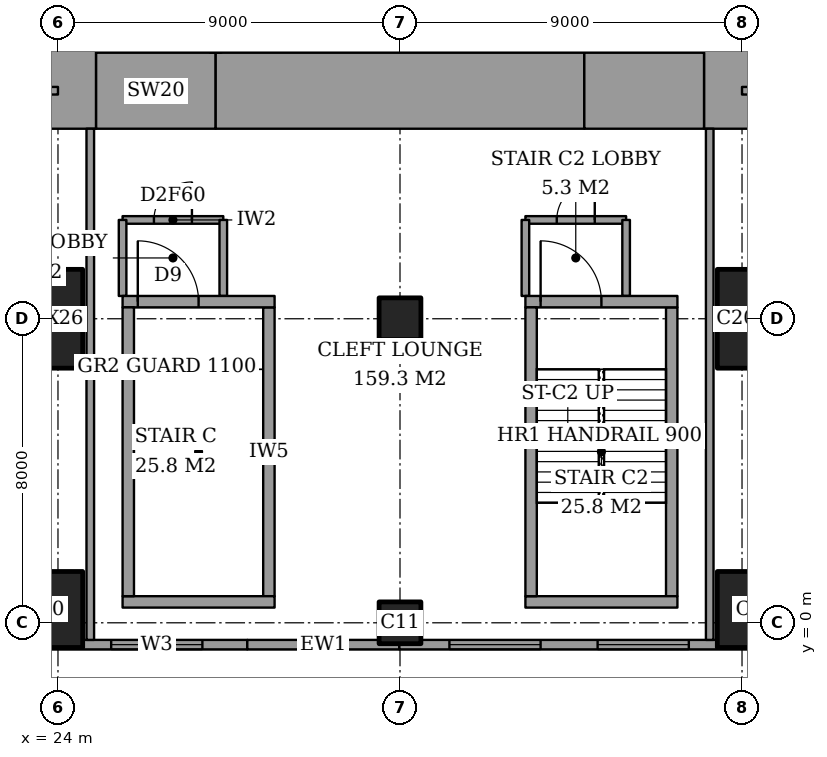
"""IFC4 building model, lengths in metres.
Left out: names, types, materials, properties, quantities, classifications, styles, units other than length and angle.
Written with IfcOpenShell. Run it as: python <this file> out.ifc"""

import sys

from ifc_helpers import new_model, si_unit, direction, frame, frame_2d, origin, origin_2d, place, context, subcontext, project, spatial, rectangle, extrude, element, fill, save


model = new_model("IFC4")
c1 = context("Model", 3, precision=1e-05, world=origin(), true_north=direction((0.0, 1.0)))
c2 = subcontext(c1, "Body", "Model", "MODEL_VIEW")
j1 = project(units=[si_unit("LENGTHUNIT", "METRE"), si_unit("PLANEANGLEUNIT", "RADIAN")], contexts=[c1])
p1 = place(None, origin())
s1 = spatial("IfcSite", under=j1, at=p1, CompositionType="ELEMENT")
p2 = place(p1, origin())
s2 = spatial("IfcBuilding", under=s1, at=p2, CompositionType="ELEMENT")
p3 = place(p2, frame((0.0, 0.0, 21.0)))
s3 = spatial("IfcBuildingStorey", under=s2, at=p3, CompositionType="ELEMENT", Elevation=21.0)
p4 = place(p3, frame((23.65, 0.35, 0.0), z_axis=(0.0, 0.0, 1.0), x_axis=(1.0, 0.0, 0.0)))
e1 = element("IfcColumn", 1, at=p4, inside=s3, PredefinedType="COLUMN", context=c2, shape_type="SweptSolid", body=[
    extrude(rectangle(XDim=2.0, YDim=2.0, at=origin_2d()), origin(), (0.0, 0.0, 1.0), 5.0),
])
p5 = place(p3, frame((23.65, 8.0, 0.0), z_axis=(0.0, 0.0, 1.0), x_axis=(1.0, 0.0, 0.0)))
e2 = element("IfcColumn", 2, at=p5, inside=s3, PredefinedType="COLUMN", context=c2, shape_type="SweptSolid", body=[
    extrude(rectangle(XDim=2.0, YDim=2.6, at=origin_2d()), origin(), (0.0, 0.0, 1.0), 5.0),
])
for number, where, z_axis, x_axis in (
    (3, (33.0, 0.0, 0.0), (0.0, 0.0, 1.0), (1.0, 0.0, 0.0)),
    (4, (33.0, 8.0, 0.0), (0.0, 0.0, 1.0), (1.0, 0.0, 0.0)),
):
    element("IfcColumn", number, at=place(p3, frame(where, z_axis=z_axis, x_axis=x_axis)), inside=s3, PredefinedType="COLUMN", context=c2, shape_type="SweptSolid", body=[
        extrude(rectangle(XDim=1.1, YDim=1.1, at=origin_2d()), origin(), (0.0, 0.0, 1.0), 5.0),
    ])
p6 = place(p3, frame((42.35, 0.35, 0.0), z_axis=(0.0, 0.0, 1.0), x_axis=(1.0, 0.0, 0.0)))
e5 = element("IfcColumn", 5, at=p6, inside=s3, PredefinedType="COLUMN", context=c2, shape_type="SweptSolid", body=[
    extrude(rectangle(XDim=2.0, YDim=2.0, at=origin_2d()), origin(), (0.0, 0.0, 1.0), 5.0),
])
p7 = place(p3, frame((42.35, 8.0, 0.0), z_axis=(0.0, 0.0, 1.0), x_axis=(1.0, 0.0, 0.0)))
e6 = element("IfcColumn", 6, at=p7, inside=s3, PredefinedType="COLUMN", context=c2, shape_type="SweptSolid", body=[
    extrude(rectangle(XDim=2.0, YDim=2.6, at=origin_2d()), origin(), (0.0, 0.0, 1.0), 5.0),
])
p8 = place(p3, frame((25.0, 14.0, 0.0), z_axis=(0.0, 0.0, 1.0), x_axis=(1.0, 0.0, 0.0)))
e7 = element("IfcWall", 7, at=p8, inside=s3, PredefinedType="SHEAR", context=c2, shape_type="SweptSolid", body=[
    extrude(rectangle(XDim=3.15, YDim=2.0, at=frame_2d((1.575, 0.0))), origin(), (0.0, 0.0, 1.0), 5.0),
])
p9 = place(p3, frame((28.15, 14.0, 0.0), z_axis=(0.0, 0.0, 1.0), x_axis=(1.0, 0.0, 0.0)))
e8 = element("IfcWall", 8, at=p9, inside=s3, PredefinedType="SHEAR", context=c2, shape_type="SweptSolid", body=[
    extrude(rectangle(XDim=9.7, YDim=2.0, at=frame_2d((4.85, 0.0))), origin(), (0.0, 0.0, 1.0), 5.0),
])
p10 = place(p3, frame((37.85, 14.0, 0.0), z_axis=(0.0, 0.0, 1.0), x_axis=(1.0, 0.0, 0.0)))
e9 = element("IfcWall", 9, at=p10, inside=s3, PredefinedType="SHEAR", context=c2, shape_type="SweptSolid", body=[
    extrude(rectangle(XDim=3.15, YDim=2.0, at=frame_2d((1.575, 0.0))), origin(), (0.0, 0.0, 1.0), 5.0),
])
p11 = place(p3, frame((24.3, 13.0, 0.0), z_axis=(0.0, 0.0, 1.0), x_axis=(0.0, 1.0, 0.0)))
e10 = element("IfcWall", 10, at=p11, inside=s3, PredefinedType="SHEAR", context=c2, shape_type="SweptSolid", body=[
    extrude(rectangle(XDim=10.15, YDim=1.4, at=frame_2d((5.075, 0.0))), origin(), (0.0, 0.0, 1.0), 5.0),
])
p12 = place(p3, frame((41.7, 13.0, 0.0), z_axis=(0.0, 0.0, 1.0), x_axis=(0.0, 1.0, 0.0)))
e11 = element("IfcWall", 11, at=p12, inside=s3, PredefinedType="SHEAR", context=c2, shape_type="SweptSolid", body=[
    extrude(rectangle(XDim=11.85, YDim=1.4, at=frame_2d((5.925, 0.0))), origin(), (0.0, 0.0, 1.0), 5.0),
])
p13 = place(p12, frame((7.5, 0.0, 0.0)))
e12 = element("IfcOpeningElement", 12, at=p13, cuts=e11, PredefinedType="OPENING", context=c2, shape_type="SweptSolid", body=[
    extrude(rectangle(XDim=1.8, YDim=2.4, at=frame_2d((0.9, 1.2))), frame((0.0, 0.71, 0.0), z_axis=(0.0, -1.0, 0.0), x_axis=(1.0, 0.0, 0.0)), (0.0, 0.0, 1.0), 1.42),
])
p14 = place(p3, frame((3.175, -0.575, 0.0), z_axis=(0.0, 0.0, 1.0), x_axis=(1.0, 0.0, 0.0)))
e13 = element("IfcWall", 13, at=p14, inside=s3, PredefinedType="SOLIDWALL", context=c2, shape_type="SweptSolid", body=[
    extrude(rectangle(XDim=25.807, YDim=0.25, at=frame_2d((12.903, 0.0))), origin(), (0.0, 0.0, 1.0), 5.0),
])
p15 = place(p14, frame((7.625, 0.0, 0.6)))
e14 = element("IfcOpeningElement", 14, at=p15, cuts=e13, PredefinedType="OPENING", context=c2, shape_type="SweptSolid", body=[
    extrude(rectangle(XDim=2.4, YDim=3.0, at=frame_2d((1.2, 1.5))), frame((0.0, 0.135, 0.0), z_axis=(0.0, -1.0, 0.0), x_axis=(1.0, 0.0, 0.0)), (0.0, 0.0, 1.0), 0.27),
])
p16 = place(p14, frame((15.45, 0.0, 0.6)))
e15 = element("IfcOpeningElement", 15, at=p16, cuts=e13, PredefinedType="OPENING", context=c2, shape_type="SweptSolid", body=[
    extrude(rectangle(XDim=2.4, YDim=3.0, at=frame_2d((1.2, 1.5))), frame((0.0, 0.135, 0.0), z_axis=(0.0, -1.0, 0.0), x_axis=(1.0, 0.0, 0.0)), (0.0, 0.0, 1.0), 0.27),
])
p17 = place(p14, frame((22.225, 0.0, 0.6)))
e16 = element("IfcOpeningElement", 16, at=p17, cuts=e13, PredefinedType="OPENING", context=c2, shape_type="SweptSolid", body=[
    extrude(rectangle(XDim=2.4, YDim=3.0, at=frame_2d((1.2, 1.5))), frame((0.0, 0.135, 0.0), z_axis=(0.0, -1.0, 0.0), x_axis=(1.0, 0.0, 0.0)), (0.0, 0.0, 1.0), 0.27),
])
p18 = place(p3, frame((25.7, 10.6, 0.0), z_axis=(0.0, 0.0, 1.0), x_axis=(1.0, 0.0, 0.0)))
e17 = element("IfcWall", 17, at=p18, inside=s3, PredefinedType="PARTITIONING", context=c2, shape_type="SweptSolid", body=[
    extrude(rectangle(XDim=2.65, YDim=0.2, at=frame_2d((1.325, 0.0))), origin(), (0.0, 0.0, 1.0), 4.65),
])
p19 = place(p18, frame((0.825, 0.0, 0.0)))
e18 = element("IfcOpeningElement", 18, at=p19, cuts=e17, PredefinedType="OPENING", context=c2, shape_type="SweptSolid", body=[
    extrude(rectangle(XDim=1.0, YDim=2.1, at=frame_2d((0.5, 1.05))), frame((0.0, 0.11, 0.0), z_axis=(0.0, -1.0, 0.0), x_axis=(1.0, 0.0, 0.0)), (0.0, 0.0, 1.0), 0.22),
])
p20 = place(p3, frame((36.3, 10.6, 0.0), z_axis=(0.0, 0.0, 1.0), x_axis=(1.0, 0.0, 0.0)))
e19 = element("IfcWall", 19, at=p20, inside=s3, PredefinedType="PARTITIONING", context=c2, shape_type="SweptSolid", body=[
    extrude(rectangle(XDim=2.65, YDim=0.2, at=frame_2d((1.325, 0.0))), origin(), (0.0, 0.0, 1.0), 4.65),
])
p21 = place(p20, frame((0.825, 0.0, 0.0)))
e20 = element("IfcOpeningElement", 20, at=p21, cuts=e19, PredefinedType="OPENING", context=c2, shape_type="SweptSolid", body=[
    extrude(rectangle(XDim=1.0, YDim=2.1, at=frame_2d((0.5, 1.05))), frame((0.0, 0.11, 0.0), z_axis=(0.0, -1.0, 0.0), x_axis=(1.0, 0.0, 0.0)), (0.0, 0.0, 1.0), 0.22),
])
p22 = place(p3, frame((14.0, 14.0, 0.0), z_axis=(0.0, 0.0, 1.0), x_axis=(1.0, 0.0, 0.0)))
e21 = element("IfcWall", 21, at=p22, inside=s3, PredefinedType="PARTITIONING", context=c2, shape_type="SweptSolid", body=[
    extrude(rectangle(XDim=10.0, YDim=0.2, at=frame_2d((5.0, 0.0))), origin(), (0.0, 0.0, 1.0), 4.65),
])
p23 = place(p3, frame((42.0, 14.0, 0.0), z_axis=(0.0, 0.0, 1.0), x_axis=(1.0, 0.0, 0.0)))
e22 = element("IfcWall", 22, at=p23, inside=s3, PredefinedType="PARTITIONING", context=c2, shape_type="SweptSolid", body=[
    extrude(rectangle(XDim=1.5, YDim=0.2, at=frame_2d((0.75, 0.0))), origin(), (0.0, 0.0, 1.0), 4.65),
])
p24 = place(p3, frame((24.85, -0.45, 0.0), z_axis=(0.0, 0.0, 1.0), x_axis=(0.0, 1.0, 0.0)))
e23 = element("IfcWall", 23, at=p24, inside=s3, PredefinedType="PARTITIONING", context=c2, shape_type="SweptSolid", body=[
    extrude(rectangle(XDim=13.45, YDim=0.2, at=frame_2d((6.725, 0.0))), origin(), (0.0, 0.0, 1.0), 4.65),
])
for number, where, z_axis, x_axis in (
    (24, (25.7, 8.6, 0.0), (0.0, 0.0, 1.0), (0.0, 1.0, 0.0)),
    (25, (28.35, 8.6, 0.0), (0.0, 0.0, 1.0), (0.0, 1.0, 0.0)),
    (26, (36.3, 8.6, 0.0), (0.0, 0.0, 1.0), (0.0, 1.0, 0.0)),
    (27, (38.95, 8.6, 0.0), (0.0, 0.0, 1.0), (0.0, 1.0, 0.0)),
):
    element("IfcWall", number, at=place(p3, frame(where, z_axis=z_axis, x_axis=x_axis)), inside=s3, PredefinedType="PARTITIONING", context=c2, shape_type="SweptSolid", body=[
        extrude(rectangle(XDim=2.0, YDim=0.2, at=frame_2d((1.0, 0.0))), origin(), (0.0, 0.0, 1.0), 4.65),
    ])
p25 = place(p3, frame((41.15, -0.45, 0.0), z_axis=(0.0, 0.0, 1.0), x_axis=(0.0, 1.0, 0.0)))
e28 = element("IfcWall", 28, at=p25, inside=s3, PredefinedType="PARTITIONING", context=c2, shape_type="SweptSolid", body=[
    extrude(rectangle(XDim=13.45, YDim=0.2, at=frame_2d((6.725, 0.0))), origin(), (0.0, 0.0, 1.0), 4.65),
])
for number, where, z_axis, x_axis in (
    (29, (31.4, 15.0, 0.0), (0.0, 0.0, 1.0), (0.0, 1.0, 0.0)),
    (30, (34.6, 15.0, 0.0), (0.0, 0.0, 1.0), (0.0, 1.0, 0.0)),
):
    element("IfcWall", number, at=place(p3, frame(where, z_axis=z_axis, x_axis=x_axis)), inside=s3, PredefinedType="PARTITIONING", context=c2, shape_type="SweptSolid", body=[
        extrude(rectangle(XDim=2.8, YDim=0.2, at=frame_2d((1.4, 0.0))), origin(), (0.0, 0.0, 1.0), 5.0),
    ])
p26 = place(p3, frame((37.85, 15.0, 0.0), z_axis=(0.0, 0.0, 1.0), x_axis=(0.0, 1.0, 0.0)))
e31 = element("IfcWall", 31, at=p26, inside=s3, PredefinedType="SHEAR", context=c2, shape_type="SweptSolid", body=[
    extrude(rectangle(XDim=2.8, YDim=0.3, at=frame_2d((1.4, 0.0))), origin(), (0.0, 0.0, 1.0), 5.0),
])
p27 = place(p3, frame((25.7, 0.55, 0.0), z_axis=(0.0, 0.0, 1.0), x_axis=(1.0, 0.0, 0.0)))
e32 = element("IfcWall", 32, at=p27, inside=s3, PredefinedType="PARTITIONING", context=c2, shape_type="SweptSolid", body=[
    extrude(rectangle(XDim=4.0, YDim=0.3, at=frame_2d((2.0, 0.0))), origin(), (0.0, 0.0, 1.0), 4.65),
])
p28 = place(p3, frame((25.7, 8.45, 0.0), z_axis=(0.0, 0.0, 1.0), x_axis=(1.0, 0.0, 0.0)))
e33 = element("IfcWall", 33, at=p28, inside=s3, PredefinedType="PARTITIONING", context=c2, shape_type="SweptSolid", body=[
    extrude(rectangle(XDim=4.0, YDim=0.3, at=frame_2d((2.0, 0.0))), origin(), (0.0, 0.0, 1.0), 4.65),
])
p29 = place(p28, frame((0.4, 0.0, 0.0)))
e34 = element("IfcOpeningElement", 34, at=p29, cuts=e33, PredefinedType="OPENING", context=c2, shape_type="SweptSolid", body=[
    extrude(rectangle(XDim=1.6, YDim=2.1, at=frame_2d((0.8, 1.05))), frame((0.0, 0.16, 0.0), z_axis=(0.0, -1.0, 0.0), x_axis=(1.0, 0.0, 0.0)), (0.0, 0.0, 1.0), 0.32),
])
for number, where, z_axis, x_axis in (
    (35, (25.85, 0.7, 0.0), (0.0, 0.0, 1.0), (0.0, 1.0, 0.0)),
    (36, (29.55, 0.7, 0.0), (0.0, 0.0, 1.0), (0.0, 1.0, 0.0)),
):
    element("IfcWall", number, at=place(p3, frame(where, z_axis=z_axis, x_axis=x_axis)), inside=s3, PredefinedType="PARTITIONING", context=c2, shape_type="SweptSolid", body=[
        extrude(rectangle(XDim=7.6, YDim=0.3, at=frame_2d((3.8, 0.0))), origin(), (0.0, 0.0, 1.0), 4.65),
    ])
p30 = place(p3, frame((36.3, 0.55, 0.0), z_axis=(0.0, 0.0, 1.0), x_axis=(1.0, 0.0, 0.0)))
e37 = element("IfcWall", 37, at=p30, inside=s3, PredefinedType="PARTITIONING", context=c2, shape_type="SweptSolid", body=[
    extrude(rectangle(XDim=4.0, YDim=0.3, at=frame_2d((2.0, 0.0))), origin(), (0.0, 0.0, 1.0), 5.0),
])
p31 = place(p3, frame((36.3, 8.45, 0.0), z_axis=(0.0, 0.0, 1.0), x_axis=(1.0, 0.0, 0.0)))
e38 = element("IfcWall", 38, at=p31, inside=s3, PredefinedType="PARTITIONING", context=c2, shape_type="SweptSolid", body=[
    extrude(rectangle(XDim=4.0, YDim=0.3, at=frame_2d((2.0, 0.0))), origin(), (0.0, 0.0, 1.0), 5.0),
])
p32 = place(p31, frame((0.4, 0.0, 0.0)))
e39 = element("IfcOpeningElement", 39, at=p32, cuts=e38, PredefinedType="OPENING", context=c2, shape_type="SweptSolid", body=[
    extrude(rectangle(XDim=1.6, YDim=2.1, at=frame_2d((0.8, 1.05))), frame((0.0, 0.16, 0.0), z_axis=(0.0, -1.0, 0.0), x_axis=(1.0, 0.0, 0.0)), (0.0, 0.0, 1.0), 0.32),
])
for number, where, z_axis, x_axis in (
    (40, (36.45, 0.7, 0.0), (0.0, 0.0, 1.0), (0.0, 1.0, 0.0)),
    (41, (40.15, 0.7, 0.0), (0.0, 0.0, 1.0), (0.0, 1.0, 0.0)),
):
    element("IfcWall", number, at=place(p3, frame(where, z_axis=z_axis, x_axis=x_axis)), inside=s3, PredefinedType="PARTITIONING", context=c2, shape_type="SweptSolid", body=[
        extrude(rectangle(XDim=7.6, YDim=0.3, at=frame_2d((3.8, 0.0))), origin(), (0.0, 0.0, 1.0), 5.0),
    ])
p33 = place(p3, frame((28.982, -0.575, 0.0), z_axis=(0.0, 0.0, 1.0), x_axis=(1.0, 0.0, 0.0)))
e42 = element("IfcWall", 42, at=p33, inside=s3, PredefinedType="SOLIDWALL", context=c2, shape_type="SweptSolid", body=[
    extrude(rectangle(XDim=4.001, YDim=0.25, at=frame_2d((2.001, 0.0))), origin(), (0.0, 0.0, 1.0), 2.85),
])
p34 = place(p3, frame((32.983, -0.575, 0.0), z_axis=(0.0, 0.0, 1.0), x_axis=(1.0, 0.0, 0.0)))
e43 = element("IfcWall", 43, at=p34, inside=s3, PredefinedType="SOLIDWALL", context=c2, shape_type="SweptSolid", body=[
    extrude(rectangle(XDim=29.842, YDim=0.25, at=frame_2d((14.921, 0.0))), origin(), (0.0, 0.0, 1.0), 5.0),
])
p35 = place(p34, frame((1.317, 0.0, 0.6)))
e44 = element("IfcOpeningElement", 44, at=p35, cuts=e43, PredefinedType="OPENING", context=c2, shape_type="SweptSolid", body=[
    extrude(rectangle(XDim=2.4, YDim=3.0, at=frame_2d((1.2, 1.5))), frame((0.0, 0.135, 0.0), z_axis=(0.0, -1.0, 0.0), x_axis=(1.0, 0.0, 0.0)), (0.0, 0.0, 1.0), 0.27),
])
p36 = place(p34, frame((5.217, 0.0, 0.6)))
e45 = element("IfcOpeningElement", 45, at=p36, cuts=e43, PredefinedType="OPENING", context=c2, shape_type="SweptSolid", body=[
    extrude(rectangle(XDim=2.4, YDim=3.0, at=frame_2d((1.2, 1.5))), frame((0.0, 0.135, 0.0), z_axis=(0.0, -1.0, 0.0), x_axis=(1.0, 0.0, 0.0)), (0.0, 0.0, 1.0), 0.27),
])
p37 = place(p34, frame((11.992, 0.0, 0.6)))
e46 = element("IfcOpeningElement", 46, at=p37, cuts=e43, PredefinedType="OPENING", context=c2, shape_type="SweptSolid", body=[
    extrude(rectangle(XDim=2.4, YDim=3.0, at=frame_2d((1.2, 1.5))), frame((0.0, 0.135, 0.0), z_axis=(0.0, -1.0, 0.0), x_axis=(1.0, 0.0, 0.0)), (0.0, 0.0, 1.0), 0.27),
])
p38 = place(p34, frame((18.317, 0.0, 0.6)))
e47 = element("IfcOpeningElement", 47, at=p38, cuts=e43, PredefinedType="OPENING", context=c2, shape_type="SweptSolid", body=[
    extrude(rectangle(XDim=2.4, YDim=3.0, at=frame_2d((1.2, 1.5))), frame((0.0, 0.135, 0.0), z_axis=(0.0, -1.0, 0.0), x_axis=(1.0, 0.0, 0.0)), (0.0, 0.0, 1.0), 0.27),
])
p39 = place(p34, frame((21.317, 0.0, 0.6)))
e48 = element("IfcOpeningElement", 48, at=p39, cuts=e43, PredefinedType="OPENING", context=c2, shape_type="SweptSolid", body=[
    extrude(rectangle(XDim=2.4, YDim=3.0, at=frame_2d((1.2, 1.5))), frame((0.0, 0.135, 0.0), z_axis=(0.0, -1.0, 0.0), x_axis=(1.0, 0.0, 0.0)), (0.0, 0.0, 1.0), 0.27),
])
p40 = place(p34, frame((26.317, 0.0, 0.6)))
e49 = element("IfcOpeningElement", 49, at=p40, cuts=e43, PredefinedType="OPENING", context=c2, shape_type="SweptSolid", body=[
    extrude(rectangle(XDim=2.4, YDim=3.0, at=frame_2d((1.2, 1.5))), frame((0.0, 0.135, 0.0), z_axis=(0.0, -1.0, 0.0), x_axis=(1.0, 0.0, 0.0)), (0.0, 0.0, 1.0), 0.27),
])
p41 = place(p17, origin())
e50 = element("IfcWindow", 50, at=p41, inside=s3, PartitioningType="SINGLE_PANEL", PredefinedType="WINDOW", context=c2, shape_type="SweptSolid", body=[
    extrude(rectangle(XDim=2.4, YDim=3.0, at=frame_2d((1.2, 1.5))), frame((0.0, 0.03, 0.0), z_axis=(0.0, -1.0, 0.0), x_axis=(1.0, 0.0, 0.0)), (0.0, 0.0, 1.0), 0.06),
])
fill(e16, e50)
p42 = place(p35, origin())
e51 = element("IfcWindow", 51, at=p42, inside=s3, PartitioningType="SINGLE_PANEL", PredefinedType="WINDOW", context=c2, shape_type="SweptSolid", body=[
    extrude(rectangle(XDim=2.4, YDim=3.0, at=frame_2d((1.2, 1.5))), frame((0.0, 0.03, 0.0), z_axis=(0.0, -1.0, 0.0), x_axis=(1.0, 0.0, 0.0)), (0.0, 0.0, 1.0), 0.06),
])
fill(e44, e51)
p43 = place(p36, origin())
e52 = element("IfcWindow", 52, at=p43, inside=s3, PartitioningType="SINGLE_PANEL", PredefinedType="WINDOW", context=c2, shape_type="SweptSolid", body=[
    extrude(rectangle(XDim=2.4, YDim=3.0, at=frame_2d((1.2, 1.5))), frame((0.0, 0.03, 0.0), z_axis=(0.0, -1.0, 0.0), x_axis=(1.0, 0.0, 0.0)), (0.0, 0.0, 1.0), 0.06),
])
fill(e45, e52)
p44 = place(p19, origin())
e53 = element("IfcDoor", 53, at=p44, inside=s3, OperationType="SINGLE_SWING_LEFT", PredefinedType="DOOR", context=c2, shape_type="SweptSolid", body=[
    extrude(rectangle(XDim=1.0, YDim=2.1, at=frame_2d((0.5, 1.05))), frame((0.0, 0.025, 0.0), z_axis=(0.0, -1.0, 0.0), x_axis=(1.0, 0.0, 0.0)), (0.0, 0.0, 1.0), 0.05),
])
fill(e18, e53)
p45 = place(p21, origin())
e54 = element("IfcDoor", 54, at=p45, inside=s3, OperationType="SINGLE_SWING_LEFT", PredefinedType="DOOR", context=c2, shape_type="SweptSolid", body=[
    extrude(rectangle(XDim=1.0, YDim=2.1, at=frame_2d((0.5, 1.05))), frame((0.0, 0.025, 0.0), z_axis=(0.0, -1.0, 0.0), x_axis=(1.0, 0.0, 0.0)), (0.0, 0.0, 1.0), 0.05),
])
fill(e20, e54)
p46 = place(p29, origin())
e55 = element("IfcDoor", 55, at=p46, inside=s3, OperationType="DOUBLE_DOOR_SINGLE_SWING", PredefinedType="DOOR", context=c2, shape_type="SweptSolid", body=[
    extrude(rectangle(XDim=1.6, YDim=2.1, at=frame_2d((0.8, 1.05))), frame((0.0, 0.025, 0.0), z_axis=(0.0, -1.0, 0.0), x_axis=(1.0, 0.0, 0.0)), (0.0, 0.0, 1.0), 0.05),
])
fill(e34, e55)
p47 = place(p32, origin())
e56 = element("IfcDoor", 56, at=p47, inside=s3, OperationType="DOUBLE_DOOR_SINGLE_SWING", PredefinedType="DOOR", context=c2, shape_type="SweptSolid", body=[
    extrude(rectangle(XDim=1.6, YDim=2.1, at=frame_2d((0.8, 1.05))), frame((0.0, 0.025, 0.0), z_axis=(0.0, -1.0, 0.0), x_axis=(1.0, 0.0, 0.0)), (0.0, 0.0, 1.0), 0.05),
])
fill(e39, e56)
save(model, sys.argv[1])
